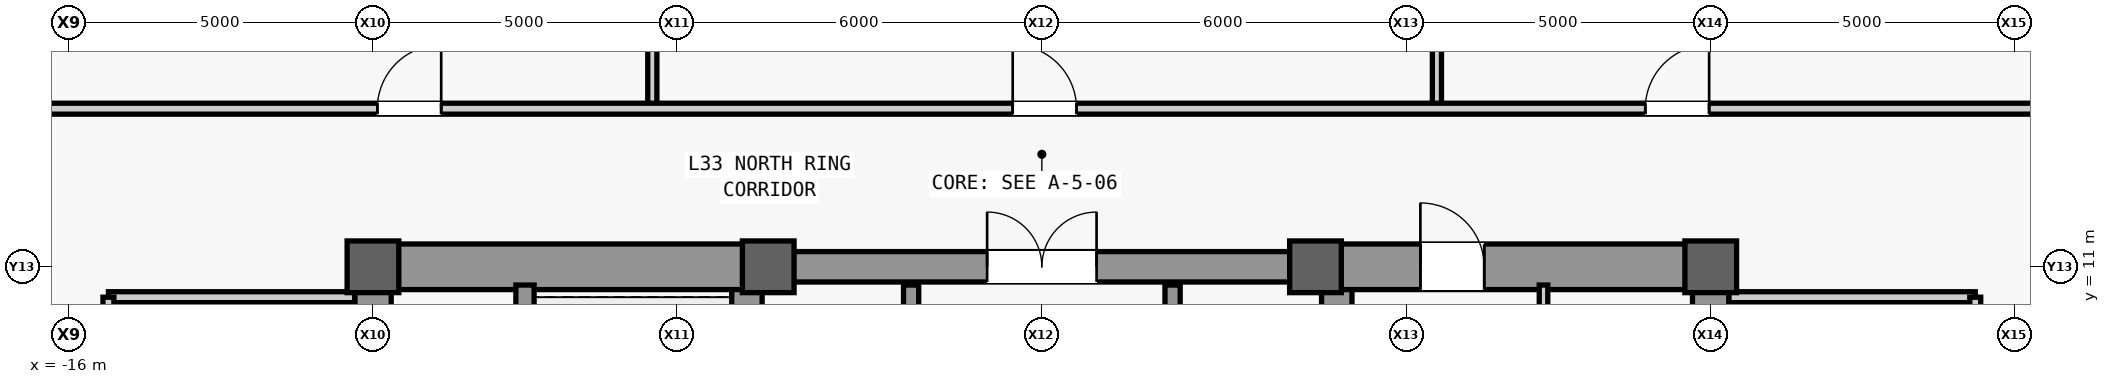
"""IFC4 building model, lengths in metres.
Left out: names, types, materials, properties, quantities, classifications, styles, units other than length and angle.
Written with IfcOpenShell. Run it as: python <this file> out.ifc"""

import sys

from ifc_helpers import new_model, si_unit, direction, frame, frame_2d, origin, origin_2d, place, context, subcontext, project, spatial, rectangle, extrude, source, transform, mapped, element, fill, save


model = new_model("IFC4")
c1 = context("Model", 3, precision=1e-05, world=origin(), true_north=direction((0.0, 1.0)))
c2 = subcontext(c1, "Body", "Model", "MODEL_VIEW")
j1 = project(units=[si_unit("LENGTHUNIT", "METRE"), si_unit("PLANEANGLEUNIT", "RADIAN")], contexts=[c1])
p1 = place(None, origin())
s1 = spatial("IfcSite", under=j1, at=p1, CompositionType="ELEMENT")
p2 = place(p1, origin())
s2 = spatial("IfcBuilding", under=s1, at=p2, CompositionType="ELEMENT")
p3 = place(p2, frame((0.0, 0.0, 144.7)))
s3 = spatial("IfcBuildingStorey", under=s2, at=p3, CompositionType="ELEMENT", Elevation=144.7)
m1 = source(origin(), c2, "Body", "SweptSolid", [
    extrude(rectangle(XDim=22.0, YDim=0.6, at=frame_2d((11.0, 0.0))), origin(), (0.0, 0.0, 1.0), 4.6),
])
p4 = place(p3, frame((-11.0, -11.0, 0.0), z_axis=(0.0, 0.0, 1.0), x_axis=(0.0, 1.0, 0.0)))
e1 = element("IfcWall", 1, at=p4, inside=s3, PredefinedType="SHEAR", context=c2, shape_type="MappedRepresentation", body=[
    mapped(m1, transform((0.0, 0.0, 0.0), scale=1.0)),
])
m2 = source(origin(), c2, "Body", "SweptSolid", [
    extrude(rectangle(XDim=1.1, YDim=2.2, at=frame_2d((0.55, 1.1))), frame((0.0, 0.31, 0.0), z_axis=(0.0, -1.0, 0.0), x_axis=(1.0, 0.0, 0.0)), (0.0, 0.0, 1.0), 0.62),
])
p5 = place(p4, frame((0.8, 0.0, 0.0)))
e2 = element("IfcOpeningElement", 2, at=p5, cuts=e1, PredefinedType="OPENING", context=c2, shape_type="MappedRepresentation", body=[
    mapped(m2, transform((0.0, 0.0, 0.0), scale=1.0)),
])
p6 = place(p4, frame((12.5, 0.0, 0.0)))
e3 = element("IfcOpeningElement", 3, at=p6, cuts=e1, PredefinedType="OPENING", context=c2, shape_type="MappedRepresentation", body=[
    mapped(m2, transform((0.0, 0.0, 0.0), scale=1.0)),
])
m3 = source(origin(), c2, "Body", "SweptSolid", [
    extrude(rectangle(XDim=0.9, YDim=2.15, at=frame_2d((0.45, 1.075))), frame((0.0, 0.31, 0.0), z_axis=(0.0, -1.0, 0.0), x_axis=(1.0, 0.0, 0.0)), (0.0, 0.0, 1.0), 0.62),
])
p7 = place(p4, frame((6.85, 0.0, 0.0)))
e4 = element("IfcOpeningElement", 4, at=p7, cuts=e1, PredefinedType="OPENING", context=c2, shape_type="MappedRepresentation", body=[
    mapped(m3, transform((0.0, 0.0, 0.0), scale=1.0)),
])
m4 = source(origin(), c2, "Body", "SweptSolid", [
    extrude(rectangle(XDim=1.2, YDim=2.3, at=frame_2d((0.6, 1.15))), frame((0.0, 0.31, 0.0), z_axis=(0.0, -1.0, 0.0), x_axis=(1.0, 0.0, 0.0)), (0.0, 0.0, 1.0), 0.62),
])
p8 = place(p4, frame((14.6, 0.0, 0.0)))
e5 = element("IfcOpeningElement", 5, at=p8, cuts=e1, PredefinedType="OPENING", context=c2, shape_type="MappedRepresentation", body=[
    mapped(m4, transform((0.0, 0.0, 0.0), scale=1.0)),
])
p9 = place(p4, frame((18.2, 0.0, 0.0)))
e6 = element("IfcOpeningElement", 6, at=p9, cuts=e1, PredefinedType="OPENING", context=c2, shape_type="MappedRepresentation", body=[
    mapped(m4, transform((0.0, 0.0, 0.0), scale=1.0)),
])
m5 = source(origin(), c2, "Body", "SweptSolid", [
    extrude(rectangle(XDim=1.3, YDim=2.3, at=frame_2d((0.65, 1.15))), frame((0.0, 0.31, 0.0), z_axis=(0.0, -1.0, 0.0), x_axis=(1.0, 0.0, 0.0)), (0.0, 0.0, 1.0), 0.62),
])
p10 = place(p4, frame((2.7, 0.0, 0.0)))
e7 = element("IfcOpeningElement", 7, at=p10, cuts=e1, PredefinedType="OPENING", context=c2, shape_type="MappedRepresentation", body=[
    mapped(m5, transform((0.0, 0.0, 0.0), scale=1.0)),
])
p11 = place(p3, frame((11.0, -11.0, 0.0), z_axis=(0.0, 0.0, 1.0), x_axis=(0.0, 1.0, 0.0)))
e8 = element("IfcWall", 8, at=p11, inside=s3, PredefinedType="SHEAR", context=c2, shape_type="MappedRepresentation", body=[
    mapped(m1, transform((0.0, 0.0, 0.0), scale=1.0)),
])
p12 = place(p11, frame((0.8, 0.0, 0.0)))
e9 = element("IfcOpeningElement", 9, at=p12, cuts=e8, PredefinedType="OPENING", context=c2, shape_type="MappedRepresentation", body=[
    mapped(m2, transform((0.0, 0.0, 0.0), scale=1.0)),
])
p13 = place(p11, frame((6.2, 0.0, 0.0)))
e10 = element("IfcOpeningElement", 10, at=p13, cuts=e8, PredefinedType="OPENING", context=c2, shape_type="MappedRepresentation", body=[
    mapped(m3, transform((0.0, 0.0, 0.0), scale=1.0)),
])
p14 = place(p11, frame((8.05, 0.0, 0.0)))
e11 = element("IfcOpeningElement", 11, at=p14, cuts=e8, PredefinedType="OPENING", context=c2, shape_type="MappedRepresentation", body=[
    mapped(m3, transform((0.0, 0.0, 0.0), scale=1.0)),
])
p15 = place(p11, frame((2.7, 0.0, 0.0)))
e12 = element("IfcOpeningElement", 12, at=p15, cuts=e8, PredefinedType="OPENING", context=c2, shape_type="MappedRepresentation", body=[
    mapped(m5, transform((0.0, 0.0, 0.0), scale=1.0)),
])
p16 = place(p11, frame((13.35, 0.0, 0.0)))
e13 = element("IfcOpeningElement", 13, at=p16, cuts=e8, PredefinedType="OPENING", context=c2, shape_type="MappedRepresentation", body=[
    mapped(m5, transform((0.0, 0.0, 0.0), scale=1.0)),
])
m6 = source(origin(), c2, "Body", "SweptSolid", [
    extrude(rectangle(XDim=21.4, YDim=0.5, at=frame_2d((10.7, 0.0))), origin(), (0.0, 0.0, 1.0), 4.6),
])
for number, where, z_axis, x_axis in (
    (14, (-4.85, -10.7, 0.0), (0.0, 0.0, 1.0), (0.0, 1.0, 0.0)),
    (15, (4.85, -10.7, 0.0), (0.0, 0.0, 1.0), (0.0, 1.0, 0.0)),
):
    element("IfcWall", number, at=place(p3, frame(where, z_axis=z_axis, x_axis=x_axis)), inside=s3, PredefinedType="SHEAR", context=c2, shape_type="MappedRepresentation", body=[
        mapped(m6, transform((0.0, 0.0, 0.0), scale=1.0)),
    ])
m7 = source(origin(), c2, "Body", "SweptSolid", [
    extrude(rectangle(XDim=5.85, YDim=0.75, at=frame_2d((2.925, 0.0))), origin(), (0.0, 0.0, 1.0), 4.6),
])
p17 = place(p3, frame((-10.7, 11.0, 0.0), z_axis=(0.0, 0.0, 1.0), x_axis=(1.0, 0.0, 0.0)))
e16 = element("IfcWall", 16, at=p17, inside=s3, PredefinedType="SHEAR", context=c2, shape_type="MappedRepresentation", body=[
    mapped(m7, transform((0.0, 0.0, 0.0), scale=1.0)),
])
p18 = place(p3, frame((4.85, 11.0, 0.0), z_axis=(0.0, 0.0, 1.0), x_axis=(1.0, 0.0, 0.0)))
e17 = element("IfcWall", 17, at=p18, inside=s3, PredefinedType="SHEAR", context=c2, shape_type="MappedRepresentation", body=[
    mapped(m7, transform((0.0, 0.0, 0.0), scale=1.0)),
])
m8 = source(origin(), c2, "Body", "SweptSolid", [
    extrude(rectangle(XDim=1.05, YDim=2.2, at=frame_2d((0.525, 1.1))), frame((0.0, 0.385, 0.0), z_axis=(0.0, -1.0, 0.0), x_axis=(1.0, 0.0, 0.0)), (0.0, 0.0, 1.0), 0.77),
])
p19 = place(p18, frame((1.375, 0.0, 0.0)))
e18 = element("IfcOpeningElement", 18, at=p19, cuts=e17, PredefinedType="OPENING", context=c2, shape_type="MappedRepresentation", body=[
    mapped(m8, transform((0.0, 0.0, 0.0), scale=1.0)),
])
m9 = source(origin(), c2, "Body", "SweptSolid", [
    extrude(rectangle(XDim=9.2, YDim=0.5, at=frame_2d((4.6, 0.0))), origin(), (0.0, 0.0, 1.0), 4.6),
])
p20 = place(p3, frame((-4.6, 11.0, 0.0), z_axis=(0.0, 0.0, 1.0), x_axis=(1.0, 0.0, 0.0)))
e19 = element("IfcWall", 19, at=p20, inside=s3, PredefinedType="SHEAR", context=c2, shape_type="MappedRepresentation", body=[
    mapped(m9, transform((0.0, 0.0, 0.0), scale=1.0)),
])
m10 = source(origin(), c2, "Body", "SweptSolid", [
    extrude(rectangle(XDim=1.8, YDim=2.25, at=frame_2d((0.9, 1.125))), frame((0.0, 0.26, 0.0), z_axis=(0.0, -1.0, 0.0), x_axis=(1.0, 0.0, 0.0)), (0.0, 0.0, 1.0), 0.52),
])
p21 = place(p20, frame((3.7, 0.0, 0.0)))
e20 = element("IfcOpeningElement", 20, at=p21, cuts=e19, PredefinedType="OPENING", context=c2, shape_type="MappedRepresentation", body=[
    mapped(m10, transform((0.0, 0.0, 0.0), scale=1.0)),
])
m11 = source(origin(), c2, "Body", "SweptSolid", [
    extrude(rectangle(XDim=0.85, YDim=0.85, at=origin_2d()), origin(), (0.0, 0.0, 1.0), 5.2),
])
for number, where, z_axis, x_axis in (
    (21, (-11.0, 11.0, 0.0), (0.0, 0.0, 1.0), (1.0, 0.0, 0.0)),
    (22, (-4.5, 11.0, 0.0), (0.0, 0.0, 1.0), (1.0, 0.0, 0.0)),
    (23, (4.5, 11.0, 0.0), (0.0, 0.0, 1.0), (1.0, 0.0, 0.0)),
    (24, (11.0, 11.0, 0.0), (0.0, 0.0, 1.0), (1.0, 0.0, 0.0)),
):
    element("IfcColumn", number, at=place(p3, frame(where, z_axis=z_axis, x_axis=x_axis)), inside=s3, PredefinedType="COLUMN", context=c2, shape_type="MappedRepresentation", body=[
        mapped(m11, transform((0.0, 0.0, 0.0), scale=1.0)),
    ])
m12 = source(origin(), c2, "Body", "SweptSolid", [
    extrude(rectangle(XDim=7.75, YDim=0.3, at=frame_2d((3.875, 0.0))), origin(), (0.0, 0.0, 1.0), 4.6),
])
p22 = place(p3, frame((-8.5, 2.95, 0.0), z_axis=(0.0, 0.0, 1.0), x_axis=(0.0, 1.0, 0.0)))
e25 = element("IfcWall", 25, at=p22, inside=s3, PredefinedType="SHEAR", context=c2, shape_type="MappedRepresentation", body=[
    mapped(m12, transform((0.0, 0.0, 0.0), scale=1.0)),
])
m13 = source(origin(), c2, "Body", "SweptSolid", [
    extrude(rectangle(XDim=9.4, YDim=0.14, at=frame_2d((4.7, 0.0))), origin(), (0.0, 0.0, 1.0), 4.6),
])
p23 = place(p3, frame((8.25, 1.3, 0.0), z_axis=(0.0, 0.0, 1.0), x_axis=(0.0, 1.0, 0.0)))
e26 = element("IfcWall", 26, at=p23, inside=s3, PredefinedType="PARTITIONING", context=c2, shape_type="MappedRepresentation", body=[
    mapped(m13, transform((0.0, 0.0, 0.0), scale=1.0)),
])
m14 = source(origin(), c2, "Body", "SweptSolid", [
    extrude(rectangle(XDim=4.05, YDim=0.18, at=frame_2d((2.025, 0.0))), origin(), (0.0, 0.0, 1.0), 4.6),
])
p24 = place(p3, frame((-15.35, 10.5, 0.0), z_axis=(0.0, 0.0, 1.0), x_axis=(1.0, 0.0, 0.0)))
e27 = element("IfcWall", 27, at=p24, inside=s3, PredefinedType="PARTITIONING", context=c2, shape_type="MappedRepresentation", body=[
    mapped(m14, transform((0.0, 0.0, 0.0), scale=1.0)),
])
m15 = source(origin(), c2, "Body", "SweptSolid", [
    extrude(rectangle(XDim=16.6, YDim=0.18, at=frame_2d((8.3, 0.0))), origin(), (0.0, 0.0, 1.0), 4.6),
])
p25 = place(p3, frame((-15.35, -6.1, 0.0), z_axis=(0.0, 0.0, 1.0), x_axis=(0.0, 1.0, 0.0)))
e28 = element("IfcWall", 28, at=p25, inside=s3, PredefinedType="PARTITIONING", context=c2, shape_type="MappedRepresentation", body=[
    mapped(m15, transform((0.0, 0.0, 0.0), scale=1.0)),
])
m16 = source(origin(), c2, "Body", "SweptSolid", [
    extrude(rectangle(XDim=1.8, YDim=2.25, at=frame_2d((0.9, 1.125))), frame((0.0, 0.1, 0.0), z_axis=(0.0, -1.0, 0.0), x_axis=(1.0, 0.0, 0.0)), (0.0, 0.0, 1.0), 0.2),
])
p26 = place(p25, frame((2.7, 0.0, 0.0)))
e29 = element("IfcOpeningElement", 29, at=p26, cuts=e28, PredefinedType="OPENING", context=c2, shape_type="MappedRepresentation", body=[
    mapped(m16, transform((0.0, 0.0, 0.0), scale=1.0)),
])
p27 = place(p25, frame((11.0, 0.0, 0.0)))
e30 = element("IfcOpeningElement", 30, at=p27, cuts=e28, PredefinedType="OPENING", context=c2, shape_type="MappedRepresentation", body=[
    mapped(m16, transform((0.0, 0.0, 0.0), scale=1.0)),
])
p28 = place(p3, frame((11.3, 10.5, 0.0), z_axis=(0.0, 0.0, 1.0), x_axis=(1.0, 0.0, 0.0)))
e31 = element("IfcWall", 31, at=p28, inside=s3, PredefinedType="PARTITIONING", context=c2, shape_type="MappedRepresentation", body=[
    mapped(m14, transform((0.0, 0.0, 0.0), scale=1.0)),
])
p29 = place(p3, frame((15.35, -6.1, 0.0), z_axis=(0.0, 0.0, 1.0), x_axis=(0.0, 1.0, 0.0)))
e32 = element("IfcWall", 32, at=p29, inside=s3, PredefinedType="PARTITIONING", context=c2, shape_type="MappedRepresentation", body=[
    mapped(m15, transform((0.0, 0.0, 0.0), scale=1.0)),
])
p30 = place(p29, frame((2.7, 0.0, 0.0)))
e33 = element("IfcOpeningElement", 33, at=p30, cuts=e32, PredefinedType="OPENING", context=c2, shape_type="MappedRepresentation", body=[
    mapped(m16, transform((0.0, 0.0, 0.0), scale=1.0)),
])
p31 = place(p29, frame((13.0, 0.0, 0.0)))
e34 = element("IfcOpeningElement", 34, at=p31, cuts=e32, PredefinedType="OPENING", context=c2, shape_type="MappedRepresentation", body=[
    mapped(m16, transform((0.0, 0.0, 0.0), scale=1.0)),
])
m17 = source(origin(), c2, "Body", "SweptSolid", [
    extrude(rectangle(XDim=5.4, YDim=0.25, at=frame_2d((2.7, 0.0))), origin(), (0.0, 0.0, 1.0), 4.6),
])
p32 = place(p3, frame((-2.15, 5.3, 0.0), z_axis=(0.0, 0.0, 1.0), x_axis=(0.0, 1.0, 0.0)))
e35 = element("IfcWall", 35, at=p32, inside=s3, PredefinedType="SHEAR", context=c2, shape_type="MappedRepresentation", body=[
    mapped(m17, transform((0.0, 0.0, 0.0), scale=1.0)),
])
m18 = source(origin(), c2, "Body", "SweptSolid", [
    extrude(rectangle(XDim=1.2, YDim=2.3, at=frame_2d((0.6, 1.15))), frame((0.0, 0.135, 0.0), z_axis=(0.0, -1.0, 0.0), x_axis=(1.0, 0.0, 0.0)), (0.0, 0.0, 1.0), 0.27),
])
p33 = place(p32, frame((3.3, 0.0, 0.0)))
e36 = element("IfcOpeningElement", 36, at=p33, cuts=e35, PredefinedType="OPENING", context=c2, shape_type="MappedRepresentation", body=[
    mapped(m18, transform((0.0, 0.0, 0.0), scale=1.0)),
])
p34 = place(p32, frame((0.9, 0.0, 0.0)))
e37 = element("IfcOpeningElement", 37, at=p34, cuts=e35, PredefinedType="OPENING", context=c2, shape_type="MappedRepresentation", body=[
    mapped(m18, transform((0.0, 0.0, 0.0), scale=1.0)),
])
p35 = place(p3, frame((2.15, 5.3, 0.0), z_axis=(0.0, 0.0, 1.0), x_axis=(0.0, 1.0, 0.0)))
e38 = element("IfcWall", 38, at=p35, inside=s3, PredefinedType="SHEAR", context=c2, shape_type="MappedRepresentation", body=[
    mapped(m17, transform((0.0, 0.0, 0.0), scale=1.0)),
])
p36 = place(p35, frame((3.3, 0.0, 0.0)))
e39 = element("IfcOpeningElement", 39, at=p36, cuts=e38, PredefinedType="OPENING", context=c2, shape_type="MappedRepresentation", body=[
    mapped(m18, transform((0.0, 0.0, 0.0), scale=1.0)),
])
p37 = place(p35, frame((0.9, 0.0, 0.0)))
e40 = element("IfcOpeningElement", 40, at=p37, cuts=e38, PredefinedType="OPENING", context=c2, shape_type="MappedRepresentation", body=[
    mapped(m18, transform((0.0, 0.0, 0.0), scale=1.0)),
])
m19 = source(origin(), c2, "Body", "SweptSolid", [
    extrude(rectangle(XDim=18.4, YDim=0.15, at=frame_2d((9.2, 0.0))), origin(), (0.0, 0.0, 1.0), 2.8),
])
p38 = place(p3, frame((-6.406, 13.6, 0.0), z_axis=(0.0, 0.0, 1.0), x_axis=(0.0, 1.0, 0.0)))
e41 = element("IfcWall", 41, at=p38, inside=s3, PredefinedType="PARTITIONING", context=c2, shape_type="MappedRepresentation", body=[
    mapped(m19, transform((0.0, 0.0, 0.0), scale=1.0)),
])
m20 = source(origin(), c2, "Body", "SweptSolid", [
    extrude(rectangle(XDim=18.4, YDim=0.15, at=frame_2d((9.2, 0.0))), origin(), (0.0, 0.0, 1.0), 4.6),
])
p39 = place(p3, frame((6.497, 13.6, 0.0), z_axis=(0.0, 0.0, 1.0), x_axis=(0.0, 1.0, 0.0)))
e42 = element("IfcWall", 42, at=p39, inside=s3, PredefinedType="PARTITIONING", context=c2, shape_type="MappedRepresentation", body=[
    mapped(m20, transform((0.0, 0.0, 0.0), scale=1.0)),
])
m21 = source(origin(), c2, "Body", "SweptSolid", [
    extrude(rectangle(XDim=37.95, YDim=0.18, at=frame_2d((18.975, 0.0))), origin(), (0.0, 0.0, 1.0), 4.6),
])
p40 = place(p3, frame((-18.55, 13.6, 0.0), z_axis=(0.0, 0.0, 1.0), x_axis=(1.0, 0.0, 0.0)))
e43 = element("IfcWall", 43, at=p40, inside=s3, PredefinedType="PARTITIONING", context=c2, shape_type="MappedRepresentation", body=[
    mapped(m21, transform((0.0, 0.0, 0.0), scale=1.0)),
])
m22 = source(origin(), c2, "Body", "SweptSolid", [
    extrude(rectangle(XDim=1.05, YDim=2.2, at=frame_2d((0.525, 1.1))), frame((0.0, 0.1, 0.0), z_axis=(0.0, -1.0, 0.0), x_axis=(1.0, 0.0, 0.0)), (0.0, 0.0, 1.0), 0.2),
])
p41 = place(p40, frame((7.622, 0.0, 0.0)))
e44 = element("IfcOpeningElement", 44, at=p41, cuts=e43, PredefinedType="OPENING", context=c2, shape_type="MappedRepresentation", body=[
    mapped(m22, transform((0.0, 0.0, 0.0), scale=1.0)),
])
p42 = place(p40, frame((18.071, 0.0, 0.0)))
e45 = element("IfcOpeningElement", 45, at=p42, cuts=e43, PredefinedType="OPENING", context=c2, shape_type="MappedRepresentation", body=[
    mapped(m22, transform((0.0, 0.0, 0.0), scale=1.0)),
])
p43 = place(p40, frame((28.473, 0.0, 0.0)))
e46 = element("IfcOpeningElement", 46, at=p43, cuts=e43, PredefinedType="OPENING", context=c2, shape_type="MappedRepresentation", body=[
    mapped(m22, transform((0.0, 0.0, 0.0), scale=1.0)),
])
m23 = source(origin(), c2, "Body", "SweptSolid", [
    extrude(rectangle(XDim=1.05, YDim=2.2, at=frame_2d((0.525, 1.1))), frame((0.0, 0.025, 0.0), z_axis=(0.0, -1.0, 0.0), x_axis=(1.0, 0.0, 0.0)), (0.0, 0.0, 1.0), 0.05),
])
p44 = place(p19, origin())
e47 = element("IfcDoor", 47, at=p44, inside=s3, OperationType="SINGLE_SWING_LEFT", PredefinedType="DOOR", context=c2, shape_type="MappedRepresentation", body=[
    mapped(m23, transform((0.0, 0.0, 0.0), scale=1.0)),
])
fill(e18, e47)
m24 = source(origin(), c2, "Body", "SweptSolid", [
    extrude(rectangle(XDim=1.8, YDim=2.25, at=frame_2d((0.9, 1.125))), frame((0.0, 0.025, 0.0), z_axis=(0.0, -1.0, 0.0), x_axis=(1.0, 0.0, 0.0)), (0.0, 0.0, 1.0), 0.05),
])
p45 = place(p21, origin())
e48 = element("IfcDoor", 48, at=p45, inside=s3, OperationType="SINGLE_SWING_RIGHT", PredefinedType="DOOR", context=c2, shape_type="MappedRepresentation", body=[
    mapped(m24, transform((0.0, 0.0, 0.0), scale=1.0)),
])
fill(e20, e48)
p46 = place(p41, origin())
e49 = element("IfcDoor", 49, at=p46, inside=s3, OperationType="SINGLE_SWING_RIGHT", PredefinedType="DOOR", context=c2, shape_type="MappedRepresentation", body=[
    mapped(m23, transform((0.0, 0.0, 0.0), scale=1.0)),
])
fill(e44, e49)
p47 = place(p42, origin())
e50 = element("IfcDoor", 50, at=p47, inside=s3, OperationType="SINGLE_SWING_LEFT", PredefinedType="DOOR", context=c2, shape_type="MappedRepresentation", body=[
    mapped(m23, transform((0.0, 0.0, 0.0), scale=1.0)),
])
fill(e45, e50)
p48 = place(p43, origin())
e51 = element("IfcDoor", 51, at=p48, inside=s3, OperationType="SINGLE_SWING_RIGHT", PredefinedType="DOOR", context=c2, shape_type="MappedRepresentation", body=[
    mapped(m23, transform((0.0, 0.0, 0.0), scale=1.0)),
])
fill(e46, e51)
save(model, sys.argv[1])
